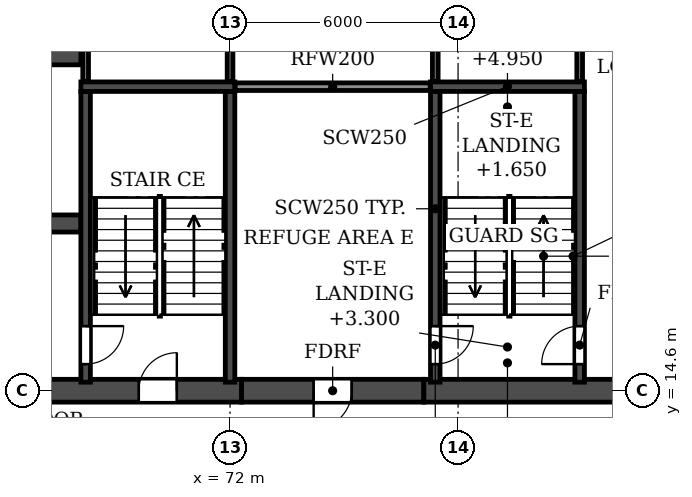
"""IFC4 building model, lengths in metres.
Left out: names, types, materials, properties, quantities, classifications, styles, units other than length and angle.
Written with IfcOpenShell. Run it as: python <this file> out.ifc"""

import sys

from ifc_helpers import new_model, si_unit, direction, frame, frame_2d, origin, place, context, subcontext, project, spatial, rectangle, extrude, element, fill, save


model = new_model("IFC4")
c1 = context("Model", 3, precision=1e-05, world=origin(), true_north=direction((0.0, 1.0)))
c2 = subcontext(c1, "Body", "Model", "MODEL_VIEW")
j1 = project(units=[si_unit("LENGTHUNIT", "METRE"), si_unit("PLANEANGLEUNIT", "RADIAN")], contexts=[c1])
p1 = place(None, origin())
s1 = spatial("IfcSite", under=j1, at=p1, CompositionType="ELEMENT")
p2 = place(p1, origin())
s2 = spatial("IfcBuilding", under=s1, at=p2, CompositionType="ELEMENT")
p3 = place(p2, frame((0.0, 0.0, 165.3)))
s3 = spatial("IfcBuildingStorey", under=s2, at=p3, CompositionType="ELEMENT", Elevation=165.3)
p4 = place(p3, frame((72.3, 14.6, 0.0), z_axis=(0.0, 0.0, 1.0), x_axis=(1.0, 0.0, 0.0)))
e1 = element("IfcWall", 1, at=p4, inside=s3, PredefinedType="SHEAR", context=c2, shape_type="SweptSolid", body=[
    extrude(rectangle(XDim=4.8, YDim=0.6, at=frame_2d((2.4, 0.0))), origin(), (0.0, 0.0, 1.0), 6.38),
])
p5 = place(p4, frame((1.9, 0.0, 0.0)))
e2 = element("IfcOpeningElement", 2, at=p5, cuts=e1, PredefinedType="OPENING", context=c2, shape_type="SweptSolid", body=[
    extrude(rectangle(XDim=1.0, YDim=2.1, at=frame_2d((0.5, 1.05))), frame((0.0, 0.31, 0.0), z_axis=(0.0, -1.0, 0.0), x_axis=(1.0, 0.0, 0.0)), (0.0, 0.0, 1.0), 0.62),
])
p6 = place(p3, frame((29.7, 14.6, 0.0), z_axis=(0.0, 0.0, 1.0), x_axis=(1.0, 0.0, 0.0)))
e3 = element("IfcWall", 3, at=p6, inside=s3, PredefinedType="SOLIDWALL", context=c2, shape_type="SweptSolid", body=[
    extrude(rectangle(XDim=42.6, YDim=0.6, at=frame_2d((21.3, 0.0))), origin(), (0.0, 0.0, 1.0), 6.38),
])
p7 = place(p6, frame((1.7, 0.0, 0.0)))
e4 = element("IfcOpeningElement", 4, at=p7, cuts=e3, PredefinedType="OPENING", context=c2, shape_type="SweptSolid", body=[
    extrude(rectangle(XDim=1.0, YDim=2.1, at=frame_2d((0.5, 1.05))), frame((0.0, 0.31, 0.0), z_axis=(0.0, -1.0, 0.0), x_axis=(1.0, 0.0, 0.0)), (0.0, 0.0, 1.0), 0.62),
])
p8 = place(p6, frame((13.0, 0.0, 0.0)))
e5 = element("IfcOpeningElement", 5, at=p8, cuts=e3, PredefinedType="OPENING", context=c2, shape_type="SweptSolid", body=[
    extrude(rectangle(XDim=1.0, YDim=2.1, at=frame_2d((0.5, 1.05))), frame((0.0, 0.31, 0.0), z_axis=(0.0, -1.0, 0.0), x_axis=(1.0, 0.0, 0.0)), (0.0, 0.0, 1.0), 0.62),
])
p9 = place(p6, frame((16.9, 0.0, 0.0)))
e6 = element("IfcOpeningElement", 6, at=p9, cuts=e3, PredefinedType="OPENING", context=c2, shape_type="SweptSolid", body=[
    extrude(rectangle(XDim=1.0, YDim=2.1, at=frame_2d((0.5, 1.05))), frame((0.0, 0.31, 0.0), z_axis=(0.0, -1.0, 0.0), x_axis=(1.0, 0.0, 0.0)), (0.0, 0.0, 1.0), 0.62),
])
p10 = place(p6, frame((20.8, 0.0, 0.0)))
e7 = element("IfcOpeningElement", 7, at=p10, cuts=e3, PredefinedType="OPENING", context=c2, shape_type="SweptSolid", body=[
    extrude(rectangle(XDim=1.0, YDim=2.1, at=frame_2d((0.5, 1.05))), frame((0.0, 0.31, 0.0), z_axis=(0.0, -1.0, 0.0), x_axis=(1.0, 0.0, 0.0)), (0.0, 0.0, 1.0), 0.62),
])
p11 = place(p6, frame((24.7, 0.0, 0.0)))
e8 = element("IfcOpeningElement", 8, at=p11, cuts=e3, PredefinedType="OPENING", context=c2, shape_type="SweptSolid", body=[
    extrude(rectangle(XDim=1.0, YDim=2.1, at=frame_2d((0.5, 1.05))), frame((0.0, 0.31, 0.0), z_axis=(0.0, -1.0, 0.0), x_axis=(1.0, 0.0, 0.0)), (0.0, 0.0, 1.0), 0.62),
])
p12 = place(p6, frame((28.6, 0.0, 0.0)))
e9 = element("IfcOpeningElement", 9, at=p12, cuts=e3, PredefinedType="OPENING", context=c2, shape_type="SweptSolid", body=[
    extrude(rectangle(XDim=1.0, YDim=2.1, at=frame_2d((0.5, 1.05))), frame((0.0, 0.31, 0.0), z_axis=(0.0, -1.0, 0.0), x_axis=(1.0, 0.0, 0.0)), (0.0, 0.0, 1.0), 0.62),
])
p13 = place(p6, frame((39.9, 0.0, 0.0)))
e10 = element("IfcOpeningElement", 10, at=p13, cuts=e3, PredefinedType="OPENING", context=c2, shape_type="SweptSolid", body=[
    extrude(rectangle(XDim=1.0, YDim=2.1, at=frame_2d((0.5, 1.05))), frame((0.0, 0.31, 0.0), z_axis=(0.0, -1.0, 0.0), x_axis=(1.0, 0.0, 0.0)), (0.0, 0.0, 1.0), 0.62),
])
p14 = place(p3, frame((77.1, 14.6, 0.0), z_axis=(0.0, 0.0, 1.0), x_axis=(1.0, 0.0, 0.0)))
e11 = element("IfcWall", 11, at=p14, inside=s3, PredefinedType="SOLIDWALL", context=c2, shape_type="SweptSolid", body=[
    extrude(rectangle(XDim=6.7, YDim=0.6, at=frame_2d((3.35, 0.0))), origin(), (0.0, 0.0, 1.0), 6.38),
])
p15 = place(p14, frame((5.0, 0.0, 0.0)))
e12 = element("IfcOpeningElement", 12, at=p15, cuts=e11, PredefinedType="OPENING", context=c2, shape_type="SweptSolid", body=[
    extrude(rectangle(XDim=1.0, YDim=2.1, at=frame_2d((0.5, 1.05))), frame((0.0, 0.31, 0.0), z_axis=(0.0, -1.0, 0.0), x_axis=(1.0, 0.0, 0.0)), (0.0, 0.0, 1.0), 0.62),
])
p16 = place(p3, frame((33.925, 19.0, 0.0), z_axis=(0.0, 0.0, 1.0), x_axis=(1.0, 0.0, 0.0)))
e13 = element("IfcWall", 13, at=p16, inside=s3, PredefinedType="SOLIDWALL", context=c2, shape_type="SweptSolid", body=[
    extrude(rectangle(XDim=34.15, YDim=0.45, at=frame_2d((17.075, 0.0))), origin(), (0.0, 0.0, 1.0), 6.38),
])
p17 = place(p16, frame((16.175, 0.0, 0.0)))
e14 = element("IfcOpeningElement", 14, at=p17, cuts=e13, PredefinedType="OPENING", context=c2, shape_type="SweptSolid", body=[
    extrude(rectangle(XDim=1.8, YDim=2.1, at=frame_2d((0.9, 1.05))), frame((0.0, 0.235, 0.0), z_axis=(0.0, -1.0, 0.0), x_axis=(1.0, 0.0, 0.0)), (0.0, 0.0, 1.0), 0.47),
])
p18 = place(p16, frame((1.525, 0.0, 0.0)))
e15 = element("IfcOpeningElement", 15, at=p18, cuts=e13, PredefinedType="OPENING", context=c2, shape_type="SweptSolid", body=[
    extrude(rectangle(XDim=1.8, YDim=2.1, at=frame_2d((0.9, 1.05))), frame((0.0, 0.235, 0.0), z_axis=(0.0, -1.0, 0.0), x_axis=(1.0, 0.0, 0.0)), (0.0, 0.0, 1.0), 0.47),
])
p19 = place(p16, frame((30.825, 0.0, 0.0)))
e16 = element("IfcOpeningElement", 16, at=p19, cuts=e13, PredefinedType="OPENING", context=c2, shape_type="SweptSolid", body=[
    extrude(rectangle(XDim=1.8, YDim=2.1, at=frame_2d((0.9, 1.05))), frame((0.0, 0.235, 0.0), z_axis=(0.0, -1.0, 0.0), x_axis=(1.0, 0.0, 0.0)), (0.0, 0.0, 1.0), 0.47),
])
p20 = place(p3, frame((33.925, 23.4, 0.0), z_axis=(0.0, 0.0, 1.0), x_axis=(1.0, 0.0, 0.0)))
e17 = element("IfcWall", 17, at=p20, inside=s3, PredefinedType="SOLIDWALL", context=c2, shape_type="SweptSolid", body=[
    extrude(rectangle(XDim=34.15, YDim=0.45, at=frame_2d((17.075, 0.0))), origin(), (0.0, 0.0, 1.0), 6.38),
])
p21 = place(p20, frame((16.175, 0.0, 0.0)))
e18 = element("IfcOpeningElement", 18, at=p21, cuts=e17, PredefinedType="OPENING", context=c2, shape_type="SweptSolid", body=[
    extrude(rectangle(XDim=1.8, YDim=2.1, at=frame_2d((0.9, 1.05))), frame((0.0, 0.235, 0.0), z_axis=(0.0, -1.0, 0.0), x_axis=(1.0, 0.0, 0.0)), (0.0, 0.0, 1.0), 0.47),
])
p22 = place(p20, frame((0.625, 0.0, 0.0)))
e19 = element("IfcOpeningElement", 19, at=p22, cuts=e17, PredefinedType="OPENING", context=c2, shape_type="SweptSolid", body=[
    extrude(rectangle(XDim=1.1, YDim=2.1, at=frame_2d((0.55, 1.05))), frame((0.0, 0.235, 0.0), z_axis=(0.0, -1.0, 0.0), x_axis=(1.0, 0.0, 0.0)), (0.0, 0.0, 1.0), 0.47),
])
p23 = place(p20, frame((3.225, 0.0, 0.0)))
e20 = element("IfcOpeningElement", 20, at=p23, cuts=e17, PredefinedType="OPENING", context=c2, shape_type="SweptSolid", body=[
    extrude(rectangle(XDim=1.1, YDim=2.1, at=frame_2d((0.55, 1.05))), frame((0.0, 0.235, 0.0), z_axis=(0.0, -1.0, 0.0), x_axis=(1.0, 0.0, 0.0)), (0.0, 0.0, 1.0), 0.47),
])
p24 = place(p20, frame((5.825, 0.0, 0.0)))
e21 = element("IfcOpeningElement", 21, at=p24, cuts=e17, PredefinedType="OPENING", context=c2, shape_type="SweptSolid", body=[
    extrude(rectangle(XDim=1.1, YDim=2.1, at=frame_2d((0.55, 1.05))), frame((0.0, 0.235, 0.0), z_axis=(0.0, -1.0, 0.0), x_axis=(1.0, 0.0, 0.0)), (0.0, 0.0, 1.0), 0.47),
])
p25 = place(p20, frame((8.425, 0.0, 0.0)))
e22 = element("IfcOpeningElement", 22, at=p25, cuts=e17, PredefinedType="OPENING", context=c2, shape_type="SweptSolid", body=[
    extrude(rectangle(XDim=1.1, YDim=2.1, at=frame_2d((0.55, 1.05))), frame((0.0, 0.235, 0.0), z_axis=(0.0, -1.0, 0.0), x_axis=(1.0, 0.0, 0.0)), (0.0, 0.0, 1.0), 0.47),
])
p26 = place(p20, frame((11.025, 0.0, 0.0)))
e23 = element("IfcOpeningElement", 23, at=p26, cuts=e17, PredefinedType="OPENING", context=c2, shape_type="SweptSolid", body=[
    extrude(rectangle(XDim=1.1, YDim=2.1, at=frame_2d((0.55, 1.05))), frame((0.0, 0.235, 0.0), z_axis=(0.0, -1.0, 0.0), x_axis=(1.0, 0.0, 0.0)), (0.0, 0.0, 1.0), 0.47),
])
p27 = place(p20, frame((13.625, 0.0, 0.0)))
e24 = element("IfcOpeningElement", 24, at=p27, cuts=e17, PredefinedType="OPENING", context=c2, shape_type="SweptSolid", body=[
    extrude(rectangle(XDim=1.1, YDim=2.1, at=frame_2d((0.55, 1.05))), frame((0.0, 0.235, 0.0), z_axis=(0.0, -1.0, 0.0), x_axis=(1.0, 0.0, 0.0)), (0.0, 0.0, 1.0), 0.47),
])
p28 = place(p20, frame((27.225, 0.0, 0.0)))
e25 = element("IfcOpeningElement", 25, at=p28, cuts=e17, PredefinedType="OPENING", context=c2, shape_type="SweptSolid", body=[
    extrude(rectangle(XDim=1.1, YDim=2.1, at=frame_2d((0.55, 1.05))), frame((0.0, 0.235, 0.0), z_axis=(0.0, -1.0, 0.0), x_axis=(1.0, 0.0, 0.0)), (0.0, 0.0, 1.0), 0.47),
])
p29 = place(p3, frame((68.2, 14.825, 0.0), z_axis=(0.0, 0.0, 1.0), x_axis=(0.0, 1.0, 0.0)))
e26 = element("IfcWall", 26, at=p29, inside=s3, PredefinedType="SOLIDWALL", context=c2, shape_type="SweptSolid", body=[
    extrude(rectangle(XDim=7.65, YDim=0.25, at=frame_2d((3.825, 0.0))), origin(), (0.0, 0.0, 1.0), 6.38),
])
p30 = place(p29, frame((0.475, 0.0, 0.0)))
e27 = element("IfcOpeningElement", 27, at=p30, cuts=e26, PredefinedType="OPENING", context=c2, shape_type="SweptSolid", body=[
    extrude(rectangle(XDim=1.0, YDim=2.1, at=frame_2d((0.5, 1.05))), frame((0.0, 0.135, 0.0), z_axis=(0.0, -1.0, 0.0), x_axis=(1.0, 0.0, 0.0)), (0.0, 0.0, 1.0), 0.27),
])
p31 = place(p3, frame((72.0, 14.825, 0.0), z_axis=(0.0, 0.0, 1.0), x_axis=(0.0, 1.0, 0.0)))
e28 = element("IfcWall", 28, at=p31, inside=s3, PredefinedType="SOLIDWALL", context=c2, shape_type="SweptSolid", body=[
    extrude(rectangle(XDim=7.65, YDim=0.25, at=frame_2d((3.825, 0.0))), origin(), (0.0, 0.0, 1.0), 6.38),
])
p32 = place(p3, frame((68.075, 22.6, 0.0), z_axis=(0.0, 0.0, 1.0), x_axis=(1.0, 0.0, 0.0)))
e29 = element("IfcWall", 29, at=p32, inside=s3, PredefinedType="SOLIDWALL", context=c2, shape_type="SweptSolid", body=[
    extrude(rectangle(XDim=4.05, YDim=0.25, at=frame_2d((2.025, 0.0))), origin(), (0.0, 0.0, 1.0), 6.38),
])
p33 = place(p3, frame((77.4, 14.825, 0.0), z_axis=(0.0, 0.0, 1.0), x_axis=(0.0, 1.0, 0.0)))
e30 = element("IfcWall", 30, at=p33, inside=s3, PredefinedType="SOLIDWALL", context=c2, shape_type="SweptSolid", body=[
    extrude(rectangle(XDim=7.65, YDim=0.25, at=frame_2d((3.825, 0.0))), origin(), (0.0, 0.0, 1.0), 6.38),
])
p34 = place(p33, frame((0.475, 0.0, 0.0)))
e31 = element("IfcOpeningElement", 31, at=p34, cuts=e30, PredefinedType="OPENING", context=c2, shape_type="SweptSolid", body=[
    extrude(rectangle(XDim=1.0, YDim=2.1, at=frame_2d((0.5, 1.05))), frame((0.0, 0.135, 0.0), z_axis=(0.0, -1.0, 0.0), x_axis=(1.0, 0.0, 0.0)), (0.0, 0.0, 1.0), 0.27),
])
p35 = place(p3, frame((81.2, 14.825, 0.0), z_axis=(0.0, 0.0, 1.0), x_axis=(0.0, 1.0, 0.0)))
e32 = element("IfcWall", 32, at=p35, inside=s3, PredefinedType="SOLIDWALL", context=c2, shape_type="SweptSolid", body=[
    extrude(rectangle(XDim=7.65, YDim=0.25, at=frame_2d((3.825, 0.0))), origin(), (0.0, 0.0, 1.0), 6.38),
])
p36 = place(p35, frame((0.475, 0.0, 0.0)))
e33 = element("IfcOpeningElement", 33, at=p36, cuts=e32, PredefinedType="OPENING", context=c2, shape_type="SweptSolid", body=[
    extrude(rectangle(XDim=1.0, YDim=2.1, at=frame_2d((0.5, 1.05))), frame((0.0, 0.135, 0.0), z_axis=(0.0, -1.0, 0.0), x_axis=(1.0, 0.0, 0.0)), (0.0, 0.0, 1.0), 0.27),
])
p37 = place(p3, frame((77.275, 22.6, 0.0), z_axis=(0.0, 0.0, 1.0), x_axis=(1.0, 0.0, 0.0)))
e34 = element("IfcWall", 34, at=p37, inside=s3, PredefinedType="SOLIDWALL", context=c2, shape_type="SweptSolid", body=[
    extrude(rectangle(XDim=4.05, YDim=0.25, at=frame_2d((2.025, 0.0))), origin(), (0.0, 0.0, 1.0), 6.38),
])
p38 = place(p3, frame((72.135, 22.6, 0.0), z_axis=(0.0, 0.0, 1.0), x_axis=(1.0, 0.0, 0.0)))
e35 = element("IfcWall", 35, at=p38, inside=s3, PredefinedType="PARTITIONING", context=c2, shape_type="SweptSolid", body=[
    extrude(rectangle(XDim=5.13, YDim=0.2, at=frame_2d((2.565, 0.0))), origin(), (0.0, 0.0, 1.0), 6.38),
])
for number, where, z_axis, x_axis in (
    (36, (68.2, 22.735, 0.0), (0.0, 0.0, 1.0), (0.0, 1.0, 0.0)),
    (37, (72.0, 22.735, 0.0), (0.0, 0.0, 1.0), (0.0, 1.0, 0.0)),
    (38, (77.4, 22.735, 0.0), (0.0, 0.0, 1.0), (0.0, 1.0, 0.0)),
    (39, (81.2, 22.735, 0.0), (0.0, 0.0, 1.0), (0.0, 1.0, 0.0)),
):
    element("IfcWall", number, at=place(p3, frame(where, z_axis=z_axis, x_axis=x_axis)), inside=s3, PredefinedType="PARTITIONING", context=c2, shape_type="SweptSolid", body=[
        extrude(rectangle(XDim=4.755, YDim=0.15, at=frame_2d((2.377, 0.0))), origin(), (0.0, 0.0, 1.0), 6.38),
    ])
p39 = place(p13, origin())
e40 = element("IfcDoor", 40, at=p39, inside=s3, OperationType="SINGLE_SWING_RIGHT", PredefinedType="DOOR", context=c2, shape_type="SweptSolid", body=[
    extrude(rectangle(XDim=1.0, YDim=2.1, at=frame_2d((0.5, 1.05))), frame((0.0, 0.025, 0.0), z_axis=(0.0, -1.0, 0.0), x_axis=(1.0, 0.0, 0.0)), (0.0, 0.0, 1.0), 0.05),
])
fill(e10, e40)
p40 = place(p5, frame((1.0, 0.0, 0.0), z_axis=(0.0, 0.0, 1.0), x_axis=(-1.0, 0.0, 0.0)))
e41 = element("IfcDoor", 41, at=p40, inside=s3, OperationType="SINGLE_SWING_RIGHT", PredefinedType="DOOR", context=c2, shape_type="SweptSolid", body=[
    extrude(rectangle(XDim=1.0, YDim=2.1, at=frame_2d((0.5, 1.05))), frame((0.0, 0.025, 0.0), z_axis=(0.0, -1.0, 0.0), x_axis=(1.0, 0.0, 0.0)), (0.0, 0.0, 1.0), 0.05),
])
fill(e2, e41)
p41 = place(p30, frame((1.0, 0.0, 0.0), z_axis=(0.0, 0.0, 1.0), x_axis=(-1.0, 0.0, 0.0)))
e42 = element("IfcDoor", 42, at=p41, inside=s3, OperationType="SINGLE_SWING_LEFT", PredefinedType="DOOR", context=c2, shape_type="SweptSolid", body=[
    extrude(rectangle(XDim=1.0, YDim=2.1, at=frame_2d((0.5, 1.05))), frame((0.0, 0.025, 0.0), z_axis=(0.0, -1.0, 0.0), x_axis=(1.0, 0.0, 0.0)), (0.0, 0.0, 1.0), 0.05),
])
fill(e27, e42)
p42 = place(p34, frame((1.0, 0.0, 0.0), z_axis=(0.0, 0.0, 1.0), x_axis=(-1.0, 0.0, 0.0)))
e43 = element("IfcDoor", 43, at=p42, inside=s3, OperationType="SINGLE_SWING_LEFT", PredefinedType="DOOR", context=c2, shape_type="SweptSolid", body=[
    extrude(rectangle(XDim=1.0, YDim=2.1, at=frame_2d((0.5, 1.05))), frame((0.0, 0.025, 0.0), z_axis=(0.0, -1.0, 0.0), x_axis=(1.0, 0.0, 0.0)), (0.0, 0.0, 1.0), 0.05),
])
fill(e31, e43)
p43 = place(p36, origin())
e44 = element("IfcDoor", 44, at=p43, inside=s3, OperationType="SINGLE_SWING_LEFT", PredefinedType="DOOR", context=c2, shape_type="SweptSolid", body=[
    extrude(rectangle(XDim=1.0, YDim=2.1, at=frame_2d((0.5, 1.05))), frame((0.0, 0.025, 0.0), z_axis=(0.0, -1.0, 0.0), x_axis=(1.0, 0.0, 0.0)), (0.0, 0.0, 1.0), 0.05),
])
fill(e33, e44)
save(model, sys.argv[1])
